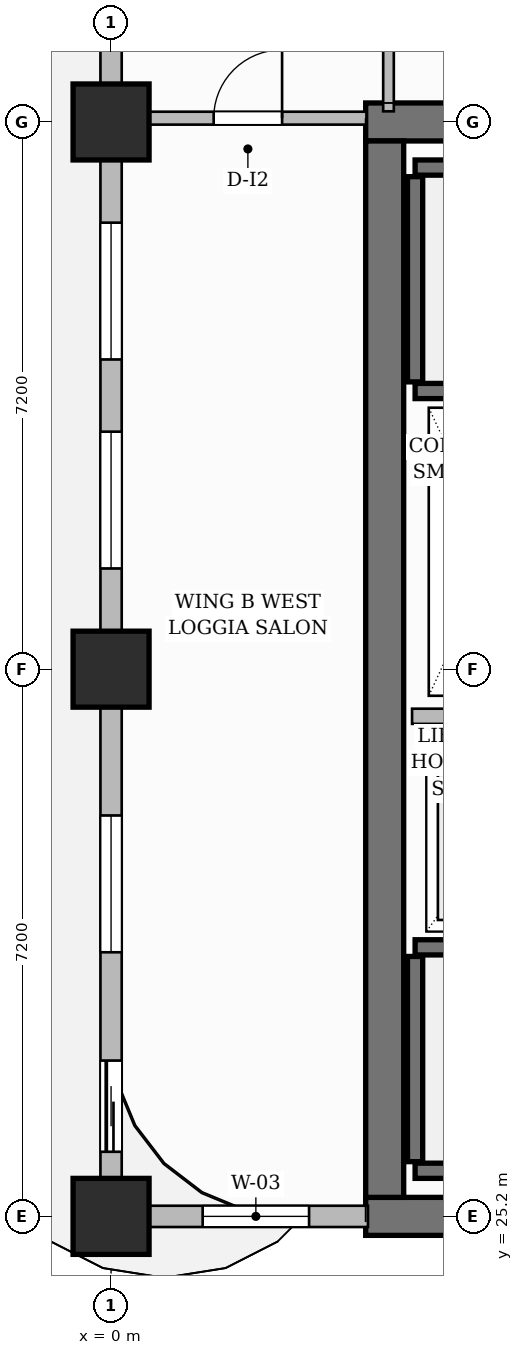
"""IFC4 building model, lengths in metres.
Left out: names, types, materials, properties, quantities, classifications, styles, units other than length and angle.
Written with IfcOpenShell. Run it as: python <this file> out.ifc"""

import sys

from ifc_helpers import new_model, si_unit, direction, frame, frame_2d, origin, origin_2d, place, context, subcontext, project, spatial, rectangle, extrude, source, transform, mapped, element, fill, save


model = new_model("IFC4")
c1 = context("Model", 3, precision=1e-05, world=origin(), true_north=direction((0.0, 1.0)))
c2 = subcontext(c1, "Body", "Model", "MODEL_VIEW")
j1 = project(units=[si_unit("LENGTHUNIT", "METRE"), si_unit("PLANEANGLEUNIT", "RADIAN")], contexts=[c1])
p1 = place(None, origin())
s1 = spatial("IfcSite", under=j1, at=p1, CompositionType="ELEMENT")
p2 = place(p1, origin())
s2 = spatial("IfcBuilding", under=s1, at=p2, CompositionType="ELEMENT")
p3 = place(p2, frame((0.0, 0.0, 173.4)))
s3 = spatial("IfcBuildingStorey", under=s2, at=p3, CompositionType="ELEMENT", Elevation=173.4)
for number, where, z_axis, x_axis in (
    (1, (3.35, 25.2, 0.0), (0.0, 0.0, 1.0), (1.0, 0.0, 0.0)),
    (2, (3.35, 39.6, 0.0), (0.0, 0.0, 1.0), (1.0, 0.0, 0.0)),
):
    element("IfcWall", number, at=place(p3, frame(where, z_axis=z_axis, x_axis=x_axis)), inside=s3, PredefinedType="SHEAR", context=c2, shape_type="SweptSolid", body=[
        extrude(rectangle(XDim=8.3, YDim=0.5, at=frame_2d((4.15, 0.0))), origin(), (0.0, 0.0, 1.0), 3.85),
    ])
p4 = place(p3, frame((3.6, 25.45, 0.0), z_axis=(0.0, 0.0, 1.0), x_axis=(0.0, 1.0, 0.0)))
e3 = element("IfcWall", 3, at=p4, inside=s3, PredefinedType="SHEAR", context=c2, shape_type="SweptSolid", body=[
    extrude(rectangle(XDim=13.9, YDim=0.5, at=frame_2d((6.95, 0.0))), origin(), (0.0, 0.0, 1.0), 3.85),
])
m1 = source(origin(), c2, "Body", "SweptSolid", [
    extrude(rectangle(XDim=1.0, YDim=1.0, at=origin_2d()), origin(), (0.0, 0.0, 1.0), 3.85),
])
for number, where, z_axis, x_axis in (
    (4, (0.0, 25.2, 0.0), (0.0, 0.0, 1.0), (1.0, 0.0, 0.0)),
    (5, (0.0, 32.4, 0.0), (0.0, 0.0, 1.0), (1.0, 0.0, 0.0)),
    (6, (0.0, 39.6, 0.0), (0.0, 0.0, 1.0), (1.0, 0.0, 0.0)),
):
    element("IfcColumn", number, at=place(p3, frame(where, z_axis=z_axis, x_axis=x_axis)), inside=s3, PredefinedType="COLUMN", context=c2, shape_type="MappedRepresentation", body=[
        mapped(m1, transform((0.0, 0.0, 0.0), scale=1.0)),
    ])
p5 = place(p3, frame((4.0, 25.8, 0.0), z_axis=(0.0, 0.0, 1.0), x_axis=(1.0, 0.0, 0.0)))
e7 = element("IfcWall", 7, at=p5, inside=s3, PredefinedType="SHEAR", context=c2, shape_type="SweptSolid", body=[
    extrude(rectangle(XDim=7.1, YDim=0.2, at=frame_2d((3.55, 0.0))), origin(), (0.0, 0.0, 1.0), 3.85),
])
p6 = place(p3, frame((4.0, 25.92, 0.0), z_axis=(0.0, 0.0, 1.0), x_axis=(0.0, 1.0, 0.0)))
e8 = element("IfcWall", 8, at=p6, inside=s3, PredefinedType="SHEAR", context=c2, shape_type="SweptSolid", body=[
    extrude(rectangle(XDim=2.7, YDim=0.2, at=frame_2d((1.35, 0.0))), origin(), (0.0, 0.0, 1.0), 3.85),
])
p7 = place(p3, frame((4.0, 28.74, 0.0), z_axis=(0.0, 0.0, 1.0), x_axis=(1.0, 0.0, 0.0)))
e9 = element("IfcWall", 9, at=p7, inside=s3, PredefinedType="SHEAR", context=c2, shape_type="SweptSolid", body=[
    extrude(rectangle(XDim=7.1, YDim=0.2, at=frame_2d((3.55, 0.0))), origin(), (0.0, 0.0, 1.0), 3.85),
])
p8 = place(p7, frame((5.815, 0.0, 0.0)))
e10 = element("IfcOpeningElement", 10, at=p8, cuts=e9, PredefinedType="OPENING", context=c2, shape_type="SweptSolid", body=[
    extrude(rectangle(XDim=1.05, YDim=2.2, at=frame_2d((0.525, 1.1))), frame((0.0, 0.11, 0.0), z_axis=(0.0, -1.0, 0.0), x_axis=(1.0, 0.0, 0.0)), (0.0, 0.0, 1.0), 0.22),
])
p9 = place(p3, frame((4.0, 39.0, 0.0), z_axis=(0.0, 0.0, 1.0), x_axis=(1.0, 0.0, 0.0)))
e11 = element("IfcWall", 11, at=p9, inside=s3, PredefinedType="SHEAR", context=c2, shape_type="SweptSolid", body=[
    extrude(rectangle(XDim=7.1, YDim=0.2, at=frame_2d((3.55, 0.0))), origin(), (0.0, 0.0, 1.0), 3.85),
])
p10 = place(p3, frame((4.0, 36.18, 0.0), z_axis=(0.0, 0.0, 1.0), x_axis=(0.0, 1.0, 0.0)))
e12 = element("IfcWall", 12, at=p10, inside=s3, PredefinedType="SHEAR", context=c2, shape_type="SweptSolid", body=[
    extrude(rectangle(XDim=2.7, YDim=0.2, at=frame_2d((1.35, 0.0))), origin(), (0.0, 0.0, 1.0), 3.85),
])
p11 = place(p3, frame((4.0, 36.06, 0.0), z_axis=(0.0, 0.0, 1.0), x_axis=(1.0, 0.0, 0.0)))
e13 = element("IfcWall", 13, at=p11, inside=s3, PredefinedType="SHEAR", context=c2, shape_type="SweptSolid", body=[
    extrude(rectangle(XDim=7.1, YDim=0.2, at=frame_2d((3.55, 0.0))), origin(), (0.0, 0.0, 1.0), 3.85),
])
p12 = place(p11, frame((5.815, 0.0, 0.0)))
e14 = element("IfcOpeningElement", 14, at=p12, cuts=e13, PredefinedType="OPENING", context=c2, shape_type="SweptSolid", body=[
    extrude(rectangle(XDim=1.05, YDim=2.2, at=frame_2d((0.525, 1.1))), frame((0.0, 0.11, 0.0), z_axis=(0.0, -1.0, 0.0), x_axis=(1.0, 0.0, 0.0)), (0.0, 0.0, 1.0), 0.22),
])
p13 = place(p3, frame((3.96, 31.78, 0.0), z_axis=(0.0, 0.0, 1.0), x_axis=(1.0, 0.0, 0.0)))
e15 = element("IfcWall", 15, at=p13, inside=s3, PredefinedType="PARTITIONING", context=c2, shape_type="SweptSolid", body=[
    extrude(rectangle(XDim=2.13, YDim=0.2, at=frame_2d((1.065, 0.0))), origin(), (0.0, 0.0, 1.0), 3.6),
])
p14 = place(p3, frame((0.24, 39.65, 0.0), z_axis=(0.0, 0.0, 1.0), x_axis=(1.0, 0.0, 0.0)))
e16 = element("IfcWall", 16, at=p14, inside=s3, PredefinedType="PARTITIONING", context=c2, shape_type="SweptSolid", body=[
    extrude(rectangle(XDim=3.12, YDim=0.17, at=frame_2d((1.56, 0.0))), origin(), (0.0, 0.0, 1.0), 3.6),
])
p15 = place(p14, frame((1.11, 0.0, 0.0)))
e17 = element("IfcOpeningElement", 17, at=p15, cuts=e16, PredefinedType="OPENING", context=c2, shape_type="SweptSolid", body=[
    extrude(rectangle(XDim=0.9, YDim=2.15, at=frame_2d((0.45, 1.075))), frame((0.0, 0.095, 0.0), z_axis=(0.0, -1.0, 0.0), x_axis=(1.0, 0.0, 0.0)), (0.0, 0.0, 1.0), 0.19),
])
p16 = place(p3, frame((3.65, 39.74, 0.0), z_axis=(0.0, 0.0, 1.0), x_axis=(0.0, 1.0, 0.0)))
e18 = element("IfcWall", 18, at=p16, inside=s3, PredefinedType="PARTITIONING", context=c2, shape_type="SweptSolid", body=[
    extrude(rectangle(XDim=1.745, YDim=0.14, at=frame_2d((0.873, 0.0))), origin(), (0.0, 0.0, 1.0), 3.6),
])
p17 = place(p3, frame((0.0, 25.2, 0.0), z_axis=(0.0, 0.0, 1.0), x_axis=(1.0, 0.0, 0.0)))
e19 = element("IfcWall", 19, at=p17, inside=s3, PredefinedType="SOLIDWALL", context=c2, shape_type="SweptSolid", body=[
    extrude(rectangle(XDim=3.38, YDim=0.28, at=frame_2d((1.69, 0.0))), origin(), (0.0, 0.0, 1.0), 3.6),
])
p18 = place(p17, frame((1.205, 0.0, 0.8)))
e20 = element("IfcOpeningElement", 20, at=p18, cuts=e19, PredefinedType="OPENING", context=c2, shape_type="SweptSolid", body=[
    extrude(rectangle(XDim=1.4, YDim=1.85, at=frame_2d((0.7, 0.925))), frame((0.0, 0.15, 0.0), z_axis=(0.0, -1.0, 0.0), x_axis=(1.0, 0.0, 0.0)), (0.0, 0.0, 1.0), 0.3),
])
p19 = place(p3, frame((0.0, 25.25, 0.0), z_axis=(0.0, 0.0, 1.0), x_axis=(0.0, 1.0, 0.0)))
e21 = element("IfcWall", 21, at=p19, inside=s3, PredefinedType="SOLIDWALL", context=c2, shape_type="SweptSolid", body=[
    extrude(rectangle(XDim=21.5, YDim=0.28, at=frame_2d((10.75, 0.0))), origin(), (0.0, 0.0, 1.0), 3.085),
])
p20 = place(p19, frame((18.607, 0.0, 0.0)))
e22 = element("IfcOpeningElement", 22, at=p20, cuts=e21, PredefinedType="OPENING", context=c2, shape_type="SweptSolid", body=[
    extrude(rectangle(XDim=1.2, YDim=2.2, at=frame_2d((0.6, 1.1))), frame((0.0, 0.15, 0.0), z_axis=(0.0, -1.0, 0.0), x_axis=(1.0, 0.0, 0.0)), (0.0, 0.0, 1.0), 0.3),
])
p21 = place(p19, frame((0.8, 0.0, 0.0)))
e23 = element("IfcOpeningElement", 23, at=p21, cuts=e21, PredefinedType="OPENING", context=c2, shape_type="SweptSolid", body=[
    extrude(rectangle(XDim=1.2, YDim=2.2, at=frame_2d((0.6, 1.1))), frame((0.0, 0.15, 0.0), z_axis=(0.0, -1.0, 0.0), x_axis=(1.0, 0.0, 0.0)), (0.0, 0.0, 1.0), 0.3),
])
p22 = place(p19, frame((3.425, 0.0, 0.8)))
e24 = element("IfcOpeningElement", 24, at=p22, cuts=e21, PredefinedType="OPENING", context=c2, shape_type="SweptSolid", body=[
    extrude(rectangle(XDim=1.8, YDim=1.85, at=frame_2d((0.9, 0.925))), frame((0.0, 0.15, 0.0), z_axis=(0.0, -1.0, 0.0), x_axis=(1.0, 0.0, 0.0)), (0.0, 0.0, 1.0), 0.3),
])
p23 = place(p19, frame((8.475, 0.0, 0.8)))
e25 = element("IfcOpeningElement", 25, at=p23, cuts=e21, PredefinedType="OPENING", context=c2, shape_type="SweptSolid", body=[
    extrude(rectangle(XDim=1.8, YDim=1.85, at=frame_2d((0.9, 0.925))), frame((0.0, 0.15, 0.0), z_axis=(0.0, -1.0, 0.0), x_axis=(1.0, 0.0, 0.0)), (0.0, 0.0, 1.0), 0.3),
])
p24 = place(p19, frame((11.225, 0.0, 0.8)))
e26 = element("IfcOpeningElement", 26, at=p24, cuts=e21, PredefinedType="OPENING", context=c2, shape_type="SweptSolid", body=[
    extrude(rectangle(XDim=1.8, YDim=1.85, at=frame_2d((0.9, 0.925))), frame((0.0, 0.15, 0.0), z_axis=(0.0, -1.0, 0.0), x_axis=(1.0, 0.0, 0.0)), (0.0, 0.0, 1.0), 0.3),
])
p25 = place(p19, frame((15.621, 0.0, 0.8)))
e27 = element("IfcOpeningElement", 27, at=p25, cuts=e21, PredefinedType="OPENING", context=c2, shape_type="SweptSolid", body=[
    extrude(rectangle(XDim=1.8, YDim=1.85, at=frame_2d((0.9, 0.925))), frame((0.0, 0.15, 0.0), z_axis=(0.0, -1.0, 0.0), x_axis=(1.0, 0.0, 0.0)), (0.0, 0.0, 1.0), 0.3),
])
m2 = source(origin(), c2, "Body", "SweptSolid", [
    extrude(rectangle(XDim=0.9, YDim=2.15, at=frame_2d((0.45, 1.075))), frame((0.0, 0.025, 0.0), z_axis=(0.0, -1.0, 0.0), x_axis=(1.0, 0.0, 0.0)), (0.0, 0.0, 1.0), 0.05),
])
p26 = place(p15, origin())
e28 = element("IfcDoor", 28, at=p26, inside=s3, OperationType="SINGLE_SWING_RIGHT", PredefinedType="DOOR", context=c2, shape_type="MappedRepresentation", body=[
    mapped(m2, transform((0.0, 0.0, 0.0), scale=1.0)),
])
fill(e17, e28)
m3 = source(origin(), c2, "Body", "SweptSolid", [
    extrude(rectangle(XDim=1.2, YDim=2.2, at=frame_2d((0.6, 1.1))), frame((0.0, 0.025, 0.0), z_axis=(0.0, -1.0, 0.0), x_axis=(1.0, 0.0, 0.0)), (0.0, 0.0, 1.0), 0.05),
])
p27 = place(p21, origin())
e29 = element("IfcDoor", 29, at=p27, inside=s3, OperationType="SLIDING_TO_LEFT", PredefinedType="DOOR", context=c2, shape_type="MappedRepresentation", body=[
    mapped(m3, transform((0.0, 0.0, 0.0), scale=1.0)),
])
fill(e23, e29)
m4 = source(origin(), c2, "Body", "SweptSolid", [
    extrude(rectangle(XDim=1.4, YDim=1.85, at=frame_2d((0.7, 0.925))), frame((0.0, 0.03, 0.0), z_axis=(0.0, -1.0, 0.0), x_axis=(1.0, 0.0, 0.0)), (0.0, 0.0, 1.0), 0.06),
])
p28 = place(p18, origin())
e30 = element("IfcWindow", 30, at=p28, inside=s3, PartitioningType="SINGLE_PANEL", PredefinedType="WINDOW", context=c2, shape_type="MappedRepresentation", body=[
    mapped(m4, transform((0.0, 0.0, 0.0), scale=1.0)),
])
fill(e20, e30)
m5 = source(origin(), c2, "Body", "SweptSolid", [
    extrude(rectangle(XDim=1.8, YDim=1.85, at=frame_2d((0.9, 0.925))), frame((0.0, 0.03, 0.0), z_axis=(0.0, -1.0, 0.0), x_axis=(1.0, 0.0, 0.0)), (0.0, 0.0, 1.0), 0.06),
])
p29 = place(p22, origin())
e31 = element("IfcWindow", 31, at=p29, inside=s3, PartitioningType="DOUBLE_PANEL_VERTICAL", PredefinedType="WINDOW", context=c2, shape_type="MappedRepresentation", body=[
    mapped(m5, transform((0.0, 0.0, 0.0), scale=1.0)),
])
fill(e24, e31)
p30 = place(p23, origin())
e32 = element("IfcWindow", 32, at=p30, inside=s3, PartitioningType="DOUBLE_PANEL_VERTICAL", PredefinedType="WINDOW", context=c2, shape_type="MappedRepresentation", body=[
    mapped(m5, transform((0.0, 0.0, 0.0), scale=1.0)),
])
fill(e25, e32)
p31 = place(p24, origin())
e33 = element("IfcWindow", 33, at=p31, inside=s3, PartitioningType="DOUBLE_PANEL_VERTICAL", PredefinedType="WINDOW", context=c2, shape_type="MappedRepresentation", body=[
    mapped(m5, transform((0.0, 0.0, 0.0), scale=1.0)),
])
fill(e26, e33)
save(model, sys.argv[1])
